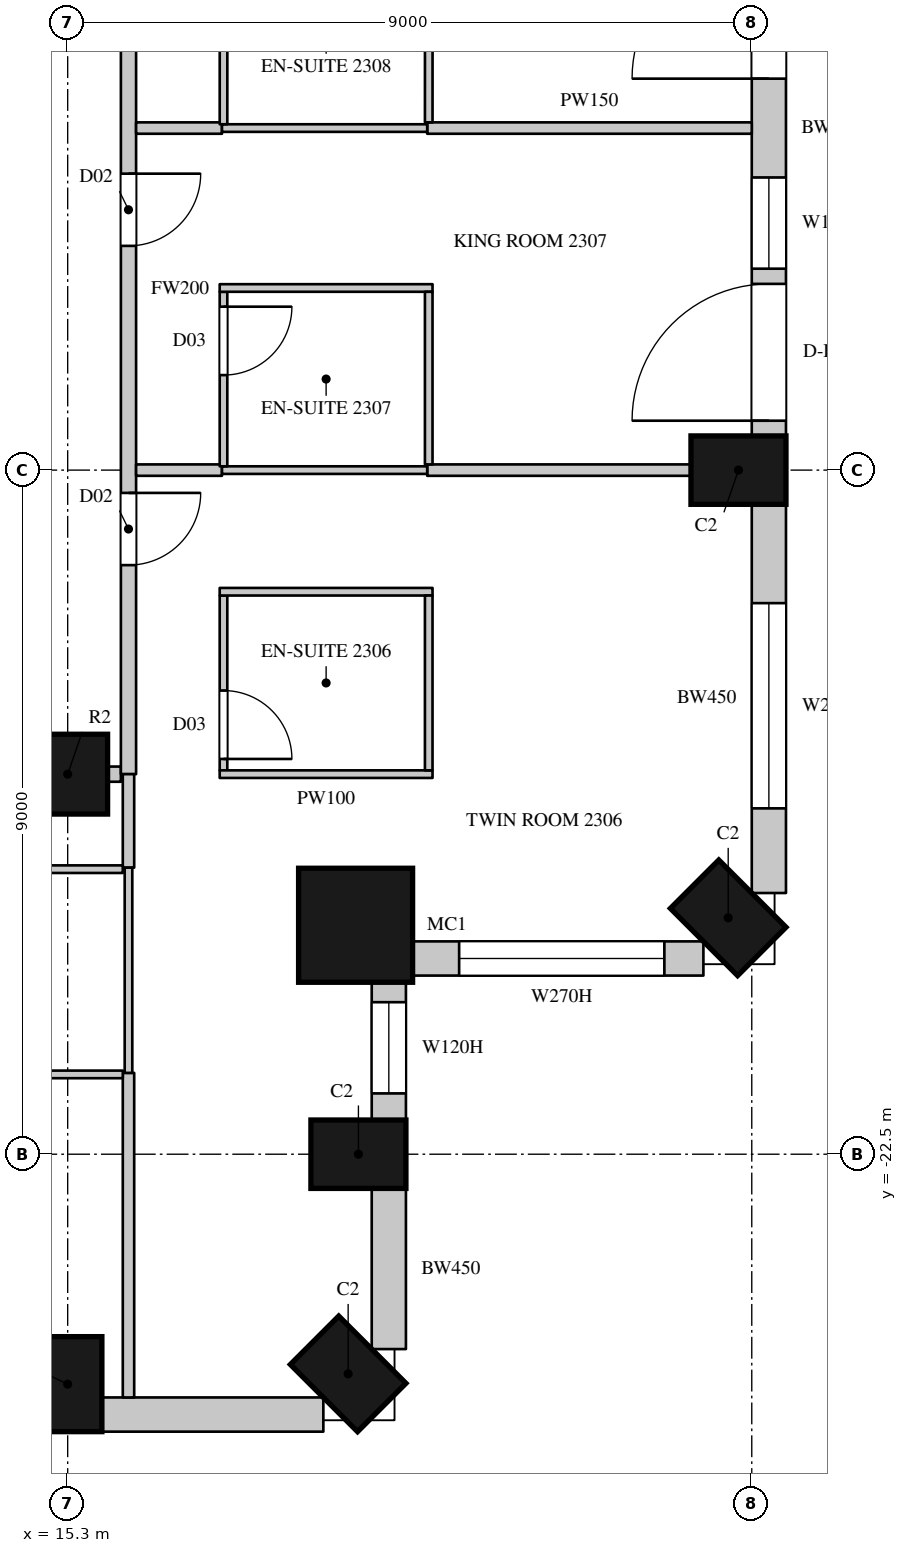
"""IFC4 building model, lengths in metres.
Left out: names, types, materials, properties, quantities, classifications, styles, units other than length and angle.
Written with IfcOpenShell. Run it as: python <this file> out.ifc"""

import sys

from ifc_helpers import new_model, si_unit, direction, frame, frame_2d, origin, origin_2d, place, context, subcontext, project, spatial, rectangle, circle, extrude, element, fill, save


model = new_model("IFC4")
c1 = context("Model", 3, precision=1e-05, world=origin(), true_north=direction((0.0, 1.0)))
c2 = subcontext(c1, "Body", "Model", "MODEL_VIEW")
j1 = project(units=[si_unit("LENGTHUNIT", "METRE"), si_unit("PLANEANGLEUNIT", "RADIAN")], contexts=[c1])
p1 = place(None, origin())
s1 = spatial("IfcSite", under=j1, at=p1, CompositionType="ELEMENT")
p2 = place(p1, origin())
s2 = spatial("IfcBuilding", under=s1, at=p2, CompositionType="ELEMENT")
p3 = place(p2, frame((0.0, 0.0, 113.1)))
s3 = spatial("IfcBuildingStorey", under=s2, at=p3, CompositionType="ELEMENT", Elevation=113.1)
for number, where, z_axis, x_axis in (
    (1, (15.3, -25.525, 0.0), (0.0, 0.0, 1.0), (1.0, 0.0, 0.0)),
    (2, (18.99, -25.39, 0.0), (0.0, 0.0, 1.0), (0.707, 0.707, 0.0)),
    (3, (19.125, -22.5, 0.0), (0.0, 0.0, 1.0), (0.0, 1.0, 0.0)),
):
    element("IfcColumn", number, at=place(p3, frame(where, z_axis=z_axis, x_axis=x_axis)), inside=s3, PredefinedType="COLUMN", context=c2, shape_type="SweptSolid", body=[
        extrude(rectangle(XDim=0.9, YDim=1.25, at=origin_2d()), origin(), (0.0, 0.0, 1.0), 3.6),
    ])
p4 = place(p3, frame((19.088, -19.488, 0.0), z_axis=(0.0, 0.0, 1.0), x_axis=(1.0, 0.0, 0.0)))
e4 = element("IfcColumn", 4, at=p4, inside=s3, PredefinedType="COLUMN", context=c2, shape_type="SweptSolid", body=[
    extrude(circle(Radius=0.75, at=origin_2d()), origin(), (0.0, 0.0, 1.0), 3.6),
])
for number, where, z_axis, x_axis in (
    (5, (23.99, -19.39, 0.0), (0.0, 0.0, 1.0), (0.707, 0.707, 0.0)),
    (6, (24.125, -13.5, 0.0), (0.0, 0.0, 1.0), (0.0, 1.0, 0.0)),
):
    element("IfcColumn", number, at=place(p3, frame(where, z_axis=z_axis, x_axis=x_axis)), inside=s3, PredefinedType="COLUMN", context=c2, shape_type="SweptSolid", body=[
        extrude(rectangle(XDim=0.9, YDim=1.25, at=origin_2d()), origin(), (0.0, 0.0, 1.0), 3.6),
    ])
p5 = place(p3, frame((15.3, -17.5, 0.0), z_axis=(0.0, 0.0, 1.0), x_axis=(1.0, 0.0, 0.0)))
e7 = element("IfcColumn", 7, at=p5, inside=s3, PredefinedType="COLUMN", context=c2, shape_type="SweptSolid", body=[
    extrude(circle(Radius=0.525, at=origin_2d()), origin(), (0.0, 0.0, 1.0), 3.6),
])
p6 = place(p3, frame((15.75, -25.925, 0.0), z_axis=(0.0, 0.0, 1.0), x_axis=(1.0, 0.0, 0.0)))
e8 = element("IfcWall", 8, at=p6, inside=s3, PredefinedType="SOLIDWALL", context=c2, shape_type="SweptSolid", body=[
    extrude(rectangle(XDim=2.914, YDim=0.45, at=frame_2d((1.457, 0.0))), origin(), (0.0, 0.0, 1.0), 3.3),
])
p7 = place(p3, frame((19.525, -25.064, 0.0), z_axis=(0.0, 0.0, 1.0), x_axis=(0.0, 1.0, 0.0)))
e9 = element("IfcWall", 9, at=p7, inside=s3, PredefinedType="SOLIDWALL", context=c2, shape_type="SweptSolid", body=[
    extrude(rectangle(XDim=2.114, YDim=0.45, at=frame_2d((1.057, 0.0))), origin(), (0.0, 0.0, 1.0), 3.3),
])
p8 = place(p3, frame((19.525, -22.05, 0.0), z_axis=(0.0, 0.0, 1.0), x_axis=(0.0, 1.0, 0.0)))
e10 = element("IfcWall", 10, at=p8, inside=s3, PredefinedType="SOLIDWALL", context=c2, shape_type="SweptSolid", body=[
    extrude(rectangle(XDim=1.843, YDim=0.45, at=frame_2d((0.921, 0.0))), origin(), (0.0, 0.0, 1.0), 3.3),
])
p9 = place(p8, frame((0.35, 0.0, 1.05)))
e11 = element("IfcOpeningElement", 11, at=p9, cuts=e10, PredefinedType="OPENING", context=c2, shape_type="SweptSolid", body=[
    extrude(rectangle(XDim=1.2, YDim=2.0, at=frame_2d((0.6, 1.0))), frame((0.0, 0.235, 0.0), z_axis=(0.0, -1.0, 0.0), x_axis=(1.0, 0.0, 0.0)), (0.0, 0.0, 1.0), 0.47),
])
p10 = place(p3, frame((19.807, -19.925, 0.0), z_axis=(0.0, 0.0, 1.0), x_axis=(1.0, 0.0, 0.0)))
e12 = element("IfcWall", 12, at=p10, inside=s3, PredefinedType="SOLIDWALL", context=c2, shape_type="SweptSolid", body=[
    extrude(rectangle(XDim=3.857, YDim=0.45, at=frame_2d((1.928, 0.0))), origin(), (0.0, 0.0, 1.0), 3.3),
])
p11 = place(p10, frame((0.643, 0.0, 1.05)))
e13 = element("IfcOpeningElement", 13, at=p11, cuts=e12, PredefinedType="OPENING", context=c2, shape_type="SweptSolid", body=[
    extrude(rectangle(XDim=2.7, YDim=2.0, at=frame_2d((1.35, 1.0))), frame((0.0, 0.235, 0.0), z_axis=(0.0, -1.0, 0.0), x_axis=(1.0, 0.0, 0.0)), (0.0, 0.0, 1.0), 0.47),
])
p12 = place(p3, frame((24.525, -19.064, 0.0), z_axis=(0.0, 0.0, 1.0), x_axis=(0.0, 1.0, 0.0)))
e14 = element("IfcWall", 14, at=p12, inside=s3, PredefinedType="SOLIDWALL", context=c2, shape_type="SweptSolid", body=[
    extrude(rectangle(XDim=5.114, YDim=0.45, at=frame_2d((2.557, 0.0))), origin(), (0.0, 0.0, 1.0), 3.3),
])
p13 = place(p12, frame((1.114, 0.0, 1.05)))
e15 = element("IfcOpeningElement", 15, at=p13, cuts=e14, PredefinedType="OPENING", context=c2, shape_type="SweptSolid", body=[
    extrude(rectangle(XDim=2.7, YDim=2.0, at=frame_2d((1.35, 1.0))), frame((0.0, 0.235, 0.0), z_axis=(0.0, -1.0, 0.0), x_axis=(1.0, 0.0, 0.0)), (0.0, 0.0, 1.0), 0.47),
])
p14 = place(p3, frame((24.525, -13.05, 0.0), z_axis=(0.0, 0.0, 1.0), x_axis=(0.0, 1.0, 0.0)))
e16 = element("IfcWall", 16, at=p14, inside=s3, PredefinedType="SOLIDWALL", context=c2, shape_type="SweptSolid", body=[
    extrude(rectangle(XDim=8.1, YDim=0.45, at=frame_2d((4.05, 0.0))), origin(), (0.0, 0.0, 1.0), 3.3),
])
p15 = place(p14, frame((0.2, 0.0, 0.0)))
e17 = element("IfcOpeningElement", 17, at=p15, cuts=e16, PredefinedType="OPENING", context=c2, shape_type="SweptSolid", body=[
    extrude(rectangle(XDim=1.8, YDim=2.4, at=frame_2d((0.9, 1.2))), frame((0.0, 0.235, 0.0), z_axis=(0.0, -1.0, 0.0), x_axis=(1.0, 0.0, 0.0)), (0.0, 0.0, 1.0), 0.47),
])
p16 = place(p14, frame((2.2, 0.0, 1.05)))
e18 = element("IfcOpeningElement", 18, at=p16, cuts=e16, PredefinedType="OPENING", context=c2, shape_type="SweptSolid", body=[
    extrude(rectangle(XDim=1.2, YDim=2.0, at=frame_2d((0.6, 1.0))), frame((0.0, 0.235, 0.0), z_axis=(0.0, -1.0, 0.0), x_axis=(1.0, 0.0, 0.0)), (0.0, 0.0, 1.0), 0.47),
])
p17 = place(p14, frame((4.7, 0.0, 0.0)))
e19 = element("IfcOpeningElement", 19, at=p17, cuts=e16, PredefinedType="OPENING", context=c2, shape_type="SweptSolid", body=[
    extrude(rectangle(XDim=1.8, YDim=2.4, at=frame_2d((0.9, 1.2))), frame((0.0, 0.235, 0.0), z_axis=(0.0, -1.0, 0.0), x_axis=(1.0, 0.0, 0.0)), (0.0, 0.0, 1.0), 0.47),
])
p18 = place(p14, frame((6.7, 0.0, 1.05)))
e20 = element("IfcOpeningElement", 20, at=p18, cuts=e16, PredefinedType="OPENING", context=c2, shape_type="SweptSolid", body=[
    extrude(rectangle(XDim=1.2, YDim=2.0, at=frame_2d((0.6, 1.0))), frame((0.0, 0.235, 0.0), z_axis=(0.0, -1.0, 0.0), x_axis=(1.0, 0.0, 0.0)), (0.0, 0.0, 1.0), 0.47),
])
p19 = place(p3, frame((15.825, -17.5, 0.0), z_axis=(0.0, 0.0, 1.0), x_axis=(1.0, 0.0, 0.0)))
e21 = element("IfcWall", 21, at=p19, inside=s3, PredefinedType="PARTITIONING", context=c2, shape_type="SweptSolid", body=[
    extrude(rectangle(XDim=0.175, YDim=0.2, at=frame_2d((0.087, 0.0))), origin(), (0.0, 0.0, 1.0), 3.3),
])
p20 = place(p3, frame((16.1, -17.5, 0.0), z_axis=(0.0, 0.0, 1.0), x_axis=(0.0, 1.0, 0.0)))
e22 = element("IfcWall", 22, at=p20, inside=s3, PredefinedType="PARTITIONING", context=c2, shape_type="SweptSolid", body=[
    extrude(rectangle(XDim=12.75, YDim=0.2, at=frame_2d((6.375, 0.0))), origin(), (0.0, 0.0, 1.0), 3.3),
])
p21 = place(p20, frame((2.75, 0.0, 0.0)))
e23 = element("IfcOpeningElement", 23, at=p21, cuts=e22, PredefinedType="OPENING", context=c2, shape_type="SweptSolid", body=[
    extrude(rectangle(XDim=0.95, YDim=2.2, at=frame_2d((0.475, 1.1))), frame((0.0, 0.11, 0.0), z_axis=(0.0, -1.0, 0.0), x_axis=(1.0, 0.0, 0.0)), (0.0, 0.0, 1.0), 0.22),
])
p22 = place(p20, frame((6.95, 0.0, 0.0)))
e24 = element("IfcOpeningElement", 24, at=p22, cuts=e22, PredefinedType="OPENING", context=c2, shape_type="SweptSolid", body=[
    extrude(rectangle(XDim=0.95, YDim=2.2, at=frame_2d((0.475, 1.1))), frame((0.0, 0.11, 0.0), z_axis=(0.0, -1.0, 0.0), x_axis=(1.0, 0.0, 0.0)), (0.0, 0.0, 1.0), 0.22),
])
p23 = place(p20, frame((11.4, 0.0, 0.0)))
e25 = element("IfcOpeningElement", 25, at=p23, cuts=e22, PredefinedType="OPENING", context=c2, shape_type="SweptSolid", body=[
    extrude(rectangle(XDim=0.95, YDim=2.2, at=frame_2d((0.475, 1.1))), frame((0.0, 0.11, 0.0), z_axis=(0.0, -1.0, 0.0), x_axis=(1.0, 0.0, 0.0)), (0.0, 0.0, 1.0), 0.22),
])
p24 = place(p3, frame((16.1, -25.7, 0.0), z_axis=(0.0, 0.0, 1.0), x_axis=(0.0, 1.0, 0.0)))
e26 = element("IfcWall", 26, at=p24, inside=s3, PredefinedType="PARTITIONING", context=c2, shape_type="SweptSolid", body=[
    extrude(rectangle(XDim=4.27, YDim=0.15, at=frame_2d((2.135, 0.0))), origin(), (0.0, 0.0, 1.0), 3.3),
])
p25 = place(p3, frame((16.1, -18.73, 0.0), z_axis=(0.0, 0.0, 1.0), x_axis=(0.0, 1.0, 0.0)))
e27 = element("IfcWall", 27, at=p25, inside=s3, PredefinedType="PARTITIONING", context=c2, shape_type="SweptSolid", body=[
    extrude(rectangle(XDim=1.23, YDim=0.15, at=frame_2d((0.615, 0.0))), origin(), (0.0, 0.0, 1.0), 3.3),
])
p26 = place(p3, frame((16.2, -13.5, 0.0), z_axis=(0.0, 0.0, 1.0), x_axis=(1.0, 0.0, 0.0)))
e28 = element("IfcWall", 28, at=p26, inside=s3, PredefinedType="PARTITIONING", context=c2, shape_type="SweptSolid", body=[
    extrude(rectangle(XDim=1.13, YDim=0.15, at=frame_2d((0.565, 0.0))), origin(), (0.0, 0.0, 1.0), 3.3),
])
p27 = place(p3, frame((16.2, -9.0, 0.0), z_axis=(0.0, 0.0, 1.0), x_axis=(1.0, 0.0, 0.0)))
e29 = element("IfcWall", 29, at=p27, inside=s3, PredefinedType="PARTITIONING", context=c2, shape_type="SweptSolid", body=[
    extrude(rectangle(XDim=1.13, YDim=0.15, at=frame_2d((0.565, 0.0))), origin(), (0.0, 0.0, 1.0), 2.65),
])
p28 = place(p3, frame((20.03, -13.5, 0.0), z_axis=(0.0, 0.0, 1.0), x_axis=(1.0, 0.0, 0.0)))
e30 = element("IfcWall", 30, at=p28, inside=s3, PredefinedType="PARTITIONING", context=c2, shape_type="SweptSolid", body=[
    extrude(rectangle(XDim=3.47, YDim=0.15, at=frame_2d((1.735, 0.0))), origin(), (0.0, 0.0, 1.0), 3.3),
])
p29 = place(p3, frame((20.03, -9.0, 0.0), z_axis=(0.0, 0.0, 1.0), x_axis=(1.0, 0.0, 0.0)))
e31 = element("IfcWall", 31, at=p29, inside=s3, PredefinedType="PARTITIONING", context=c2, shape_type="SweptSolid", body=[
    extrude(rectangle(XDim=4.27, YDim=0.15, at=frame_2d((2.135, 0.0))), origin(), (0.0, 0.0, 1.0), 2.65),
])
for number, where, z_axis, x_axis in (
    (32, (13.65, -21.45, 0.0), (0.0, 0.0, 1.0), (1.0, 0.0, 0.0)),
    (33, (13.65, -18.75, 0.0), (0.0, 0.0, 1.0), (1.0, 0.0, 0.0)),
):
    element("IfcWall", number, at=place(p3, frame(where, z_axis=z_axis, x_axis=x_axis)), inside=s3, PredefinedType="PARTITIONING", context=c2, shape_type="SweptSolid", body=[
        extrude(rectangle(XDim=2.375, YDim=0.1, at=frame_2d((1.188, 0.0))), origin(), (0.0, 0.0, 1.0), 3.3),
    ])
for number, where, z_axis, x_axis in (
    (34, (16.1, -21.43, 0.0), (0.0, 0.0, 1.0), (0.0, 1.0, 0.0)),
    (35, (17.33, -13.5, 0.0), (0.0, 0.0, 1.0), (1.0, 0.0, 0.0)),
):
    element("IfcWall", number, at=place(p3, frame(where, z_axis=z_axis, x_axis=x_axis)), inside=s3, PredefinedType="PARTITIONING", context=c2, shape_type="SweptSolid", body=[
        extrude(rectangle(XDim=2.7, YDim=0.1, at=frame_2d((1.35, 0.0))), origin(), (0.0, 0.0, 1.0), 3.3),
    ])
p30 = place(p3, frame((17.33, -9.0, 0.0), z_axis=(0.0, 0.0, 1.0), x_axis=(1.0, 0.0, 0.0)))
e36 = element("IfcWall", 36, at=p30, inside=s3, PredefinedType="PARTITIONING", context=c2, shape_type="SweptSolid", body=[
    extrude(rectangle(XDim=2.7, YDim=0.1, at=frame_2d((1.35, 0.0))), origin(), (0.0, 0.0, 1.0), 2.65),
])
p31 = place(p3, frame((17.35, -17.45, 0.0), z_axis=(0.0, 0.0, 1.0), x_axis=(0.0, 1.0, 0.0)))
e37 = element("IfcWall", 37, at=p31, inside=s3, PredefinedType="PARTITIONING", context=c2, shape_type="SweptSolid", body=[
    extrude(rectangle(XDim=2.3, YDim=0.1, at=frame_2d((1.15, 0.0))), origin(), (0.0, 0.0, 1.0), 3.3),
])
p32 = place(p31, frame((0.15, 0.0, 0.0)))
e38 = element("IfcOpeningElement", 38, at=p32, cuts=e37, PredefinedType="OPENING", context=c2, shape_type="SweptSolid", body=[
    extrude(rectangle(XDim=0.9, YDim=2.2, at=frame_2d((0.45, 1.1))), frame((0.0, 0.06, 0.0), z_axis=(0.0, -1.0, 0.0), x_axis=(1.0, 0.0, 0.0)), (0.0, 0.0, 1.0), 0.12),
])
for number, where, z_axis, x_axis in (
    (39, (17.3, -17.5, 0.0), (0.0, 0.0, 1.0), (1.0, 0.0, 0.0)),
    (40, (17.3, -15.1, 0.0), (0.0, 0.0, 1.0), (1.0, 0.0, 0.0)),
):
    element("IfcWall", number, at=place(p3, frame(where, z_axis=z_axis, x_axis=x_axis)), inside=s3, PredefinedType="PARTITIONING", context=c2, shape_type="SweptSolid", body=[
        extrude(rectangle(XDim=2.8, YDim=0.1, at=frame_2d((1.4, 0.0))), origin(), (0.0, 0.0, 1.0), 3.3),
    ])
p33 = place(p3, frame((17.35, -13.45, 0.0), z_axis=(0.0, 0.0, 1.0), x_axis=(0.0, 1.0, 0.0)))
e41 = element("IfcWall", 41, at=p33, inside=s3, PredefinedType="PARTITIONING", context=c2, shape_type="SweptSolid", body=[
    extrude(rectangle(XDim=2.296, YDim=0.1, at=frame_2d((1.148, 0.0))), origin(), (0.0, 0.0, 1.0), 3.3),
])
p34 = place(p33, frame((1.2, 0.0, 0.0)))
e42 = element("IfcOpeningElement", 42, at=p34, cuts=e41, PredefinedType="OPENING", context=c2, shape_type="SweptSolid", body=[
    extrude(rectangle(XDim=0.9, YDim=2.2, at=frame_2d((0.45, 1.1))), frame((0.0, 0.06, 0.0), z_axis=(0.0, -1.0, 0.0), x_axis=(1.0, 0.0, 0.0)), (0.0, 0.0, 1.0), 0.12),
])
p35 = place(p3, frame((17.3, -11.104, 0.0), z_axis=(0.0, 0.0, 1.0), x_axis=(1.0, 0.0, 0.0)))
e43 = element("IfcWall", 43, at=p35, inside=s3, PredefinedType="PARTITIONING", context=c2, shape_type="SweptSolid", body=[
    extrude(rectangle(XDim=2.8, YDim=0.1, at=frame_2d((1.4, 0.0))), origin(), (0.0, 0.0, 1.0), 3.3),
])
p36 = place(p3, frame((17.35, -8.95, 0.0), z_axis=(0.0, 0.0, 1.0), x_axis=(0.000407580973, 0.999999916939, 0.0)))
e44 = element("IfcWall", 44, at=p36, inside=s3, PredefinedType="PARTITIONING", context=c2, shape_type="SweptSolid", body=[
    extrude(rectangle(XDim=2.396, YDim=0.1, at=frame_2d((1.198, 0.0))), origin(), (0.0, 0.0, 1.0), 3.3),
])
p37 = place(p36, frame((1.25, 0.0, 0.0)))
e45 = element("IfcOpeningElement", 45, at=p37, cuts=e44, PredefinedType="OPENING", context=c2, shape_type="SweptSolid", body=[
    extrude(rectangle(XDim=0.9, YDim=2.2, at=frame_2d((0.45, 1.1))), frame((0.0, 0.06, 0.0), z_axis=(0.0, -1.0, 0.0), x_axis=(1.0, 0.0, 0.0)), (0.0, 0.0, 1.0), 0.12),
])
p38 = place(p3, frame((20.05, -17.45, 0.0), z_axis=(0.0, 0.0, 1.0), x_axis=(0.0, 1.0, 0.0)))
e46 = element("IfcWall", 46, at=p38, inside=s3, PredefinedType="PARTITIONING", context=c2, shape_type="SweptSolid", body=[
    extrude(rectangle(XDim=2.3, YDim=0.1, at=frame_2d((1.15, 0.0))), origin(), (0.0, 0.0, 1.0), 3.3),
])
p39 = place(p3, frame((20.05, -13.425, 0.0), z_axis=(0.0, 0.0, 1.0), x_axis=(0.0, 1.0, 0.0)))
e47 = element("IfcWall", 47, at=p39, inside=s3, PredefinedType="PARTITIONING", context=c2, shape_type="SweptSolid", body=[
    extrude(rectangle(XDim=2.271, YDim=0.1, at=frame_2d((1.135, 0.0))), origin(), (0.0, 0.0, 1.0), 3.3),
])
p40 = place(p3, frame((20.05, -8.925, 0.0), z_axis=(0.0, 0.0, 1.0), x_axis=(0.000430200003, 0.999999907464, 0.0)))
e48 = element("IfcWall", 48, at=p40, inside=s3, PredefinedType="PARTITIONING", context=c2, shape_type="SweptSolid", body=[
    extrude(rectangle(XDim=2.27, YDim=0.1, at=frame_2d((1.135, 0.0))), origin(), (0.0, 0.0, 1.0), 3.3),
])
p41 = place(p9, origin())
e49 = element("IfcWindow", 49, at=p41, inside=s3, PartitioningType="SINGLE_PANEL", PredefinedType="WINDOW", context=c2, shape_type="SweptSolid", body=[
    extrude(rectangle(XDim=1.2, YDim=2.0, at=frame_2d((0.6, 1.0))), frame((0.0, 0.135, 0.0), z_axis=(0.0, -1.0, 0.0), x_axis=(1.0, 0.0, 0.0)), (0.0, 0.0, 1.0), 0.06),
])
fill(e11, e49)
p42 = place(p11, origin())
e50 = element("IfcWindow", 50, at=p42, inside=s3, PartitioningType="SINGLE_PANEL", PredefinedType="WINDOW", context=c2, shape_type="SweptSolid", body=[
    extrude(rectangle(XDim=2.7, YDim=2.0, at=frame_2d((1.35, 1.0))), frame((0.0, 0.135, 0.0), z_axis=(0.0, -1.0, 0.0), x_axis=(1.0, 0.0, 0.0)), (0.0, 0.0, 1.0), 0.06),
])
fill(e13, e50)
p43 = place(p13, origin())
e51 = element("IfcWindow", 51, at=p43, inside=s3, PartitioningType="SINGLE_PANEL", PredefinedType="WINDOW", context=c2, shape_type="SweptSolid", body=[
    extrude(rectangle(XDim=2.7, YDim=2.0, at=frame_2d((1.35, 1.0))), frame((0.0, 0.135, 0.0), z_axis=(0.0, -1.0, 0.0), x_axis=(1.0, 0.0, 0.0)), (0.0, 0.0, 1.0), 0.06),
])
fill(e15, e51)
p44 = place(p15, origin())
e52 = element("IfcDoor", 52, at=p44, inside=s3, OperationType="SLIDING_TO_LEFT", PredefinedType="DOOR", context=c2, shape_type="SweptSolid", body=[
    extrude(rectangle(XDim=1.8, YDim=2.4, at=frame_2d((0.9, 1.2))), frame((0.0, 0.13, 0.0), z_axis=(0.0, -1.0, 0.0), x_axis=(1.0, 0.0, 0.0)), (0.0, 0.0, 1.0), 0.05),
])
fill(e17, e52)
p45 = place(p16, origin())
e53 = element("IfcWindow", 53, at=p45, inside=s3, PartitioningType="SINGLE_PANEL", PredefinedType="WINDOW", context=c2, shape_type="SweptSolid", body=[
    extrude(rectangle(XDim=1.2, YDim=2.0, at=frame_2d((0.6, 1.0))), frame((0.0, 0.135, 0.0), z_axis=(0.0, -1.0, 0.0), x_axis=(1.0, 0.0, 0.0)), (0.0, 0.0, 1.0), 0.06),
])
fill(e18, e53)
p46 = place(p17, origin())
e54 = element("IfcDoor", 54, at=p46, inside=s3, OperationType="SLIDING_TO_LEFT", PredefinedType="DOOR", context=c2, shape_type="SweptSolid", body=[
    extrude(rectangle(XDim=1.8, YDim=2.4, at=frame_2d((0.9, 1.2))), frame((0.0, 0.13, 0.0), z_axis=(0.0, -1.0, 0.0), x_axis=(1.0, 0.0, 0.0)), (0.0, 0.0, 1.0), 0.05),
])
fill(e19, e54)
p47 = place(p21, origin())
e55 = element("IfcDoor", 55, at=p47, inside=s3, OperationType="SINGLE_SWING_LEFT", PredefinedType="DOOR", context=c2, shape_type="SweptSolid", body=[
    extrude(rectangle(XDim=0.95, YDim=2.2, at=frame_2d((0.475, 1.1))), frame((0.0, 0.025, 0.0), z_axis=(0.0, -1.0, 0.0), x_axis=(1.0, 0.0, 0.0)), (0.0, 0.0, 1.0), 0.05),
])
fill(e23, e55)
p48 = place(p32, origin())
e56 = element("IfcDoor", 56, at=p48, inside=s3, OperationType="SINGLE_SWING_RIGHT", PredefinedType="DOOR", context=c2, shape_type="SweptSolid", body=[
    extrude(rectangle(XDim=0.9, YDim=2.2, at=frame_2d((0.45, 1.1))), frame((0.0, 0.025, 0.0), z_axis=(0.0, -1.0, 0.0), x_axis=(1.0, 0.0, 0.0)), (0.0, 0.0, 1.0), 0.05),
])
fill(e38, e56)
p49 = place(p22, origin())
e57 = element("IfcDoor", 57, at=p49, inside=s3, OperationType="SINGLE_SWING_LEFT", PredefinedType="DOOR", context=c2, shape_type="SweptSolid", body=[
    extrude(rectangle(XDim=0.95, YDim=2.2, at=frame_2d((0.475, 1.1))), frame((0.0, 0.025, 0.0), z_axis=(0.0, -1.0, 0.0), x_axis=(1.0, 0.0, 0.0)), (0.0, 0.0, 1.0), 0.05),
])
fill(e24, e57)
p50 = place(p34, origin())
e58 = element("IfcDoor", 58, at=p50, inside=s3, OperationType="SINGLE_SWING_LEFT", PredefinedType="DOOR", context=c2, shape_type="SweptSolid", body=[
    extrude(rectangle(XDim=0.9, YDim=2.2, at=frame_2d((0.45, 1.1))), frame((0.0, 0.025, 0.0), z_axis=(0.0, -1.0, 0.0), x_axis=(1.0, 0.0, 0.0)), (0.0, 0.0, 1.0), 0.05),
])
fill(e42, e58)
save(model, sys.argv[1])
